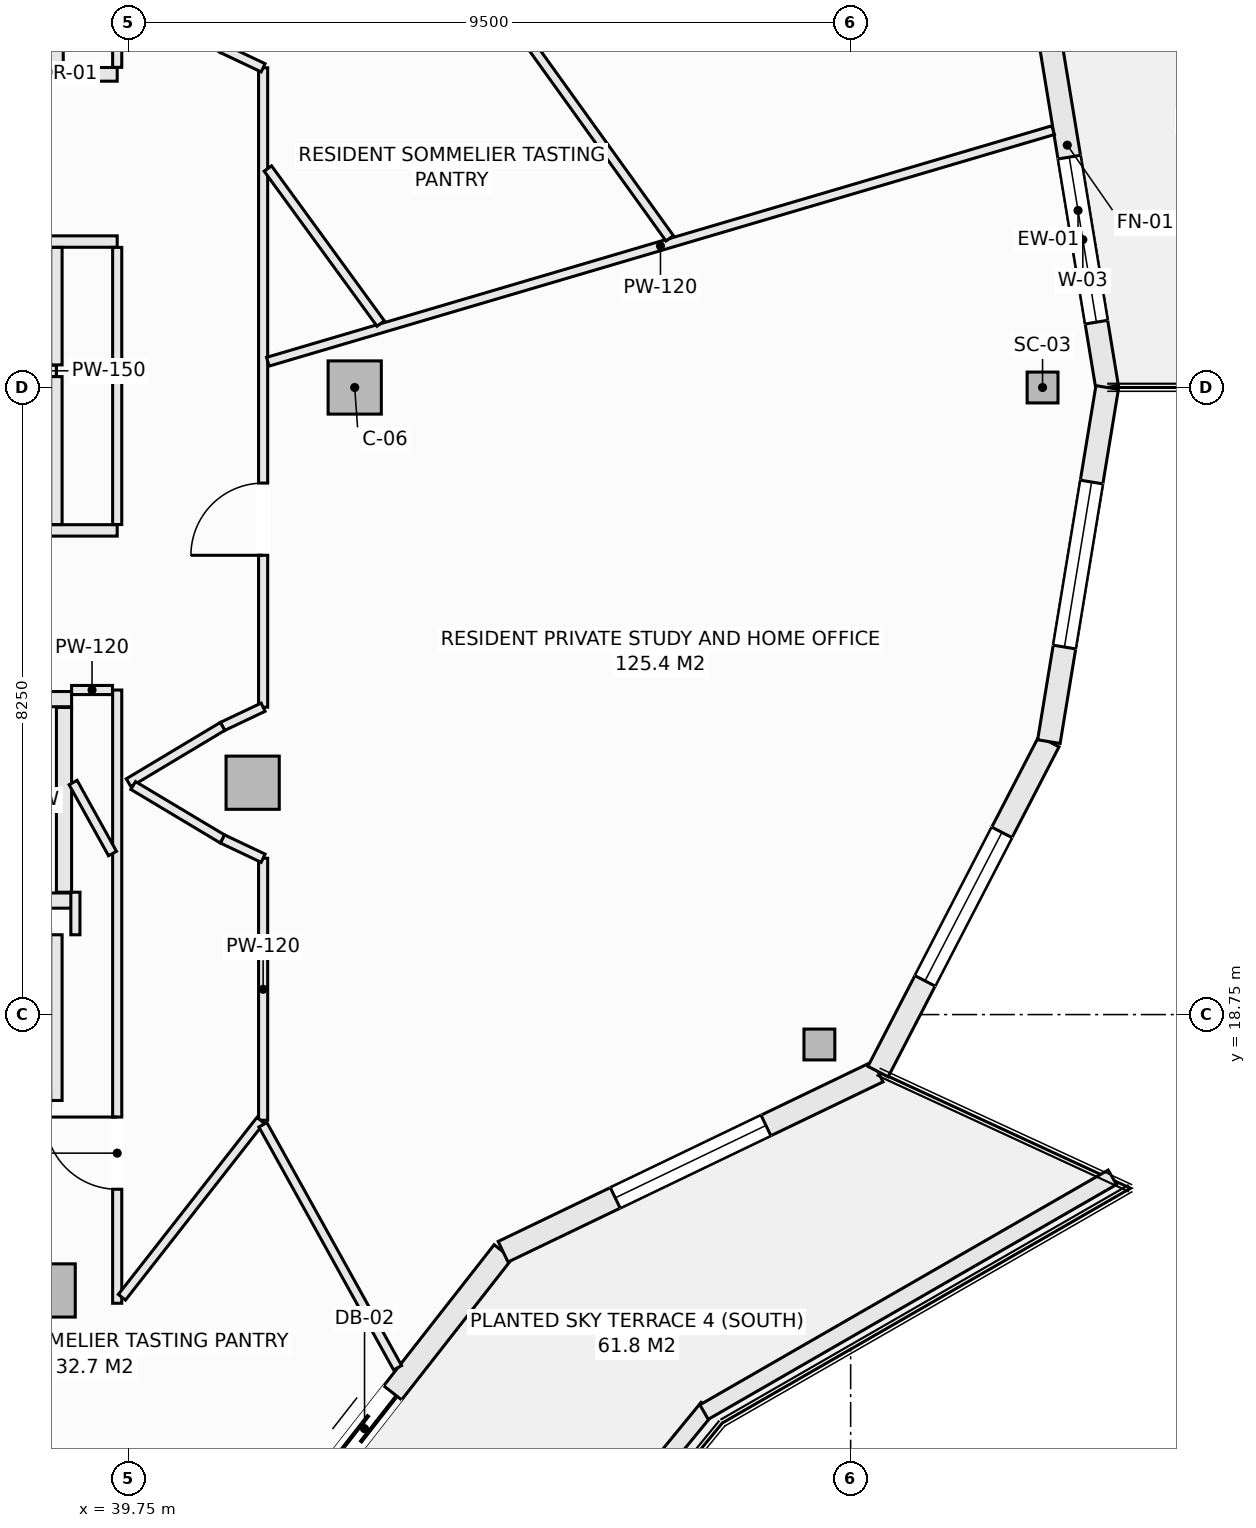
"""IFC4 building model, lengths in metres.
Left out: names, types, materials, properties, quantities, classifications, styles, units other than length and angle.
Written with IfcOpenShell. Run it as: python <this file> out.ifc"""

import sys

from ifc_helpers import new_model, si_unit, direction, frame, frame_2d, origin, origin_2d, place, context, subcontext, project, spatial, rectangle, hollow_rectangle, extrude, element, fill, save


model = new_model("IFC4")
c1 = context("Model", 3, precision=1e-05, world=origin(), true_north=direction((0.0, 1.0)))
c2 = subcontext(c1, "Body", "Model", "MODEL_VIEW")
j1 = project(units=[si_unit("LENGTHUNIT", "METRE"), si_unit("PLANEANGLEUNIT", "RADIAN")], contexts=[c1])
p1 = place(None, origin())
s1 = spatial("IfcSite", under=j1, at=p1, CompositionType="ELEMENT")
p2 = place(p1, origin())
s2 = spatial("IfcBuilding", under=s1, at=p2, CompositionType="ELEMENT")
p3 = place(p2, frame((0.0, 0.0, 245.9)))
s3 = spatial("IfcBuildingStorey", under=s2, at=p3, CompositionType="ELEMENT", Elevation=245.9)
for number, where, z_axis, x_axis in (
    (1, (51.775, 27.0, -0.27), (0.0, 0.0, 1.0), (1.0, 0.0, 0.0)),
    (2, (48.839, 18.356, -0.27), (0.0, 0.0, 1.0), (1.0, 0.0, 0.0)),
):
    element("IfcColumn", number, at=place(p3, frame(where, z_axis=z_axis, x_axis=x_axis)), inside=s3, PredefinedType="COLUMN", context=c2, shape_type="SweptSolid", body=[
        extrude(hollow_rectangle(XDim=0.406, YDim=0.406, WallThickness=0.016, at=origin_2d()), origin(), (0.0, 0.0, 1.0), 3.3),
    ])
for number, where, z_axis, x_axis in (
    (3, (42.725, 27.0, -0.27), (0.0, 0.0, 1.0), (1.0, 0.0, 0.0)),
    (4, (38.698, 15.121, -0.27), (0.0, 0.0, 1.0), (1.0, 0.0, 0.0)),
    (5, (41.382, 21.801, -0.27), (0.0, 0.0, 1.0), (1.0, 0.0, 0.0)),
):
    element("IfcColumn", number, at=place(p3, frame(where, z_axis=z_axis, x_axis=x_axis)), inside=s3, PredefinedType="COLUMN", context=c2, shape_type="SweptSolid", body=[
        extrude(rectangle(XDim=0.7, YDim=0.7, at=origin_2d()), origin(), (0.0, 0.0, 1.0), 3.3),
    ])
p4 = place(p3, frame((51.858, 31.659, 0.0), z_axis=(0.0, 0.0, 1.0), x_axis=(0.162369371657, -0.986730047758, 0.0)))
e6 = element("IfcWall", 6, at=p4, inside=s3, PredefinedType="SOLIDWALL", context=c2, shape_type="SweptSolid", body=[
    extrude(rectangle(XDim=4.721, YDim=0.3, at=frame_2d((2.361, 0.0))), origin(), (0.0, 0.0, 1.0), 2.605),
])
p5 = place(p4, frame((1.65, 0.0, 0.72)))
e7 = element("IfcOpeningElement", 7, at=p5, cuts=e6, PredefinedType="OPENING", context=c2, shape_type="SweptSolid", body=[
    extrude(rectangle(XDim=2.2, YDim=1.65, at=frame_2d((1.1, 0.825))), frame((0.0, 0.16, 0.0), z_axis=(0.0, -1.0, 0.0), x_axis=(1.0, 0.0, 0.0)), (0.0, 0.0, 1.0), 0.32),
])
p6 = place(p3, frame((41.375, 11.412, 0.0), z_axis=(0.0, 0.0, 1.0), x_axis=(0.61644588519, 0.787397276241, 0.0)))
e8 = element("IfcWall", 8, at=p6, inside=s3, PredefinedType="SOLIDWALL", context=c2, shape_type="SweptSolid", body=[
    extrude(rectangle(XDim=5.357, YDim=0.3, at=frame_2d((2.678, 0.0))), origin(), (0.0, 0.0, 1.0), 2.605),
])
p7 = place(p6, frame((1.8, 0.0, 0.0)))
e9 = element("IfcOpeningElement", 9, at=p7, cuts=e8, PredefinedType="OPENING", context=c2, shape_type="SweptSolid", body=[
    extrude(rectangle(XDim=1.2, YDim=2.2, at=frame_2d((0.6, 1.1))), frame((0.0, 0.16, 0.0), z_axis=(0.0, -1.0, 0.0), x_axis=(1.0, 0.0, 0.0)), (0.0, 0.0, 1.0), 0.32),
])
p8 = place(p3, frame((44.677, 15.63, 0.0), z_axis=(0.0, 0.0, 1.0), x_axis=(0.901355238351, 0.433080517106, 0.0)))
e10 = element("IfcWall", 10, at=p8, inside=s3, PredefinedType="SOLIDWALL", context=c2, shape_type="SweptSolid", body=[
    extrude(rectangle(XDim=5.473, YDim=0.3, at=frame_2d((2.737, 0.0))), origin(), (0.0, 0.0, 1.0), 2.605),
])
p9 = place(p8, frame((1.637, 0.0, 0.72)))
e11 = element("IfcOpeningElement", 11, at=p9, cuts=e10, PredefinedType="OPENING", context=c2, shape_type="SweptSolid", body=[
    extrude(rectangle(XDim=2.2, YDim=1.65, at=frame_2d((1.1, 0.825))), frame((0.0, 0.16, 0.0), z_axis=(0.0, -1.0, 0.0), x_axis=(1.0, 0.0, 0.0)), (0.0, 0.0, 1.0), 0.32),
])
p10 = place(p3, frame((49.611, 18.0, 0.0), z_axis=(0.0, 0.0, 1.0), x_axis=(0.459793771602, 0.888025724625, 0.0)))
e12 = element("IfcWall", 12, at=p10, inside=s3, PredefinedType="SOLIDWALL", context=c2, shape_type="SweptSolid", body=[
    extrude(rectangle(XDim=4.889, YDim=0.3, at=frame_2d((2.444, 0.0))), origin(), (0.0, 0.0, 1.0), 2.605),
])
p11 = place(p10, frame((1.344, 0.0, 0.72)))
e13 = element("IfcOpeningElement", 13, at=p11, cuts=e12, PredefinedType="OPENING", context=c2, shape_type="SweptSolid", body=[
    extrude(rectangle(XDim=2.2, YDim=1.65, at=frame_2d((1.1, 0.825))), frame((0.0, 0.16, 0.0), z_axis=(0.0, -1.0, 0.0), x_axis=(1.0, 0.0, 0.0)), (0.0, 0.0, 1.0), 0.32),
])
p12 = place(p3, frame((51.858, 22.341, 0.0), z_axis=(0.0, 0.0, 1.0), x_axis=(0.162369371657, 0.986730047758, 0.0)))
e14 = element("IfcWall", 14, at=p12, inside=s3, PredefinedType="SOLIDWALL", context=c2, shape_type="SweptSolid", body=[
    extrude(rectangle(XDim=4.721, YDim=0.3, at=frame_2d((2.361, 0.0))), origin(), (0.0, 0.0, 1.0), 2.605),
])
p13 = place(p12, frame((1.261, 0.0, 0.72)))
e15 = element("IfcOpeningElement", 15, at=p13, cuts=e14, PredefinedType="OPENING", context=c2, shape_type="SweptSolid", body=[
    extrude(rectangle(XDim=2.2, YDim=1.65, at=frame_2d((1.1, 0.825))), frame((0.0, 0.16, 0.0), z_axis=(0.0, -1.0, 0.0), x_axis=(1.0, 0.0, 0.0)), (0.0, 0.0, 1.0), 0.32),
])
p14 = place(p3, frame((43.323, 8.646, 0.0), z_axis=(0.0, 0.0, 1.0), x_axis=(0.63407318032, 0.77327304492, 0.0)))
e16 = element("IfcWall", 16, at=p14, inside=s3, PredefinedType="PARAPET", context=c2, shape_type="SweptSolid", body=[
    extrude(rectangle(XDim=6.379, YDim=0.22, at=frame_2d((3.189, 0.0))), origin(), (0.0, 0.0, 1.0), 0.52),
])
p15 = place(p3, frame((47.321, 13.521, 0.0), z_axis=(0.0, 0.0, 1.0), x_axis=(0.866901621005, 0.49847926687, 0.0)))
e17 = element("IfcWall", 17, at=p15, inside=s3, PredefinedType="PARAPET", context=c2, shape_type="SweptSolid", body=[
    extrude(rectangle(XDim=6.197, YDim=0.22, at=frame_2d((3.098, 0.0))), origin(), (0.0, 0.0, 1.0), 0.52),
])
p16 = place(p3, frame((36.75, 22.9, 0.0), z_axis=(0.0, 0.0, 1.0), x_axis=(1.0, 0.0, 0.0)))
e18 = element("IfcWall", 18, at=p16, inside=s3, PredefinedType="SOLIDWALL", context=c2, shape_type="SweptSolid", body=[
    extrude(rectangle(XDim=2.25, YDim=0.2, at=frame_2d((1.125, 0.0))), origin(), (0.0, 0.0, 1.0), 3.03),
])
p17 = place(p16, frame((0.575, 0.0, 0.0)))
e19 = element("IfcOpeningElement", 19, at=p17, cuts=e18, PredefinedType="OPENING", context=c2, shape_type="SweptSolid", body=[
    extrude(rectangle(XDim=1.1, YDim=2.2, at=frame_2d((0.55, 1.1))), frame((0.0, 0.11, 0.0), z_axis=(0.0, -1.0, 0.0), x_axis=(1.0, 0.0, 0.0)), (0.0, 0.0, 1.0), 0.22),
])
p18 = place(p3, frame((36.75, 20.25, 0.0), z_axis=(0.0, 0.0, 1.0), x_axis=(1.0, 0.0, 0.0)))
e20 = element("IfcWall", 20, at=p18, inside=s3, PredefinedType="SOLIDWALL", context=c2, shape_type="SweptSolid", body=[
    extrude(rectangle(XDim=2.25, YDim=0.2, at=frame_2d((1.125, 0.0))), origin(), (0.0, 0.0, 1.0), 3.03),
])
p19 = place(p3, frame((38.9, 20.36, 0.0), z_axis=(0.0, 0.0, 1.0), x_axis=(0.0, 1.0, 0.0)))
e21 = element("IfcWall", 21, at=p19, inside=s3, PredefinedType="SOLIDWALL", context=c2, shape_type="SweptSolid", body=[
    extrude(rectangle(XDim=2.43, YDim=0.2, at=frame_2d((1.215, 0.0))), origin(), (0.0, 0.0, 1.0), 3.03),
])
p20 = place(p3, frame((30.077, 28.92, 0.0), z_axis=(0.0, 0.0, 1.0), x_axis=(1.0, 0.0, 0.0)))
e22 = element("IfcWall", 22, at=p20, inside=s3, PredefinedType="PARTITIONING", context=c2, shape_type="SweptSolid", body=[
    extrude(rectangle(XDim=9.523, YDim=0.15, at=frame_2d((4.762, 0.0))), origin(), (0.0, 0.0, 1.0), 3.03),
])
p21 = place(p20, frame((1.342, 0.0, 0.0)))
e23 = element("IfcOpeningElement", 23, at=p21, cuts=e22, PredefinedType="OPENING", context=c2, shape_type="SweptSolid", body=[
    extrude(rectangle(XDim=0.95, YDim=2.1, at=frame_2d((0.475, 1.05))), frame((0.0, 0.085, 0.0), z_axis=(0.0, -1.0, 0.0), x_axis=(1.0, 0.0, 0.0)), (0.0, 0.0, 1.0), 0.17),
])
p22 = place(p20, frame((5.498, 0.0, 0.0)))
e24 = element("IfcOpeningElement", 24, at=p22, cuts=e22, PredefinedType="OPENING", context=c2, shape_type="SweptSolid", body=[
    extrude(rectangle(XDim=0.95, YDim=2.1, at=frame_2d((0.475, 1.05))), frame((0.0, 0.085, 0.0), z_axis=(0.0, -1.0, 0.0), x_axis=(1.0, 0.0, 0.0)), (0.0, 0.0, 1.0), 0.17),
])
p23 = place(p3, frame((33.377, 25.12, 0.0), z_axis=(0.0, 0.0, 1.0), x_axis=(1.0, 0.0, 0.0)))
e25 = element("IfcWall", 25, at=p23, inside=s3, PredefinedType="PARTITIONING", context=c2, shape_type="SweptSolid", body=[
    extrude(rectangle(XDim=6.223, YDim=0.15, at=frame_2d((3.112, 0.0))), origin(), (0.0, 0.0, 1.0), 3.03),
])
p24 = place(p23, frame((2.441, 0.0, 0.0)))
e26 = element("IfcOpeningElement", 26, at=p24, cuts=e25, PredefinedType="OPENING", context=c2, shape_type="SweptSolid", body=[
    extrude(rectangle(XDim=0.95, YDim=2.1, at=frame_2d((0.475, 1.05))), frame((0.0, 0.085, 0.0), z_axis=(0.0, -1.0, 0.0), x_axis=(1.0, 0.0, 0.0)), (0.0, 0.0, 1.0), 0.17),
])
p25 = place(p3, frame((33.377, 27.22, 0.0), z_axis=(0.0, 0.0, 1.0), x_axis=(1.0, 0.0, 0.0)))
e27 = element("IfcWall", 27, at=p25, inside=s3, PredefinedType="PARTITIONING", context=c2, shape_type="SweptSolid", body=[
    extrude(rectangle(XDim=5.423, YDim=0.15, at=frame_2d((2.711, 0.0))), origin(), (0.0, 0.0, 1.0), 3.03),
])
p26 = place(p3, frame((38.8, 17.62, 0.0), z_axis=(0.0, 0.0, 1.0), x_axis=(0.0, 1.0, 0.0)))
e28 = element("IfcWall", 28, at=p26, inside=s3, PredefinedType="PARTITIONING", context=c2, shape_type="SweptSolid", body=[
    extrude(rectangle(XDim=2.18, YDim=0.15, at=frame_2d((1.09, 0.0))), origin(), (0.0, 0.0, 1.0), 3.03),
])
p27 = place(p3, frame((38.8, 25.197, 0.0), z_axis=(0.0, 0.0, 1.0), x_axis=(0.0, 1.0, 0.0)))
e29 = element("IfcWall", 29, at=p27, inside=s3, PredefinedType="PARTITIONING", context=c2, shape_type="SweptSolid", body=[
    extrude(rectangle(XDim=1.946, YDim=0.15, at=frame_2d((0.973, 0.0))), origin(), (0.0, 0.0, 1.0), 3.03),
])
p28 = place(p3, frame((38.8, 27.297, 0.0), z_axis=(0.0, 0.0, 1.0), x_axis=(0.0, 1.0, 0.0)))
e30 = element("IfcWall", 30, at=p28, inside=s3, PredefinedType="PARTITIONING", context=c2, shape_type="SweptSolid", body=[
    extrude(rectangle(XDim=1.546, YDim=0.15, at=frame_2d((0.773, 0.0))), origin(), (0.0, 0.0, 1.0), 3.03),
])
p29 = place(p3, frame((38.8, 31.12, 0.0), z_axis=(0.0, 0.0, 1.0), x_axis=(0.0, 1.0, 0.0)))
e31 = element("IfcWall", 31, at=p29, inside=s3, PredefinedType="SOLIDWALL", context=c2, shape_type="SweptSolid", body=[
    extrude(rectangle(XDim=2.63, YDim=0.18, at=frame_2d((1.315, 0.0))), origin(), (0.0, 0.0, 1.0), 3.03),
])
p30 = place(p3, frame((38.892, 31.12, 0.0), z_axis=(0.0, 0.0, 1.0), x_axis=(1.0, 0.0, 0.0)))
e32 = element("IfcWall", 32, at=p30, inside=s3, PredefinedType="SOLIDWALL", context=c2, shape_type="SweptSolid", body=[
    extrude(rectangle(XDim=0.708, YDim=0.18, at=frame_2d((0.354, 0.0))), origin(), (0.0, 0.0, 1.0), 3.03),
])
p31 = place(p3, frame((39.05, 19.8, 0.0), z_axis=(0.0, 0.0, 1.0), x_axis=(0.0, 1.0, 0.0)))
e33 = element("IfcWall", 33, at=p31, inside=s3, PredefinedType="PARTITIONING", context=c2, shape_type="SweptSolid", body=[
    extrude(rectangle(XDim=0.56, YDim=0.12, at=frame_2d((0.28, 0.0))), origin(), (0.0, 0.0, 1.0), 3.03),
])
p32 = place(p3, frame((39.6, 14.952, 0.0), z_axis=(0.0, 0.0, 1.0), x_axis=(0.0, 1.0, 0.0)))
e34 = element("IfcWall", 34, at=p32, inside=s3, PredefinedType="PARTITIONING", context=c2, shape_type="SweptSolid", body=[
    extrude(rectangle(XDim=8.068, YDim=0.12, at=frame_2d((4.034, 0.0))), origin(), (0.0, 0.0, 1.0), 2.478),
])
p33 = place(p32, frame((1.5, 0.0, 0.0)))
e35 = element("IfcOpeningElement", 35, at=p33, cuts=e34, PredefinedType="OPENING", context=c2, shape_type="SweptSolid", body=[
    extrude(rectangle(XDim=0.95, YDim=2.1, at=frame_2d((0.475, 1.05))), frame((0.0, 0.07, 0.0), z_axis=(0.0, -1.0, 0.0), x_axis=(1.0, 0.0, 0.0)), (0.0, 0.0, 1.0), 0.14),
])
p34 = place(p3, frame((39.6, 25.197, 0.0), z_axis=(0.0, 0.0, 1.0), x_axis=(0.0, 1.0, 0.0)))
e36 = element("IfcWall", 36, at=p34, inside=s3, PredefinedType="PARTITIONING", context=c2, shape_type="SweptSolid", body=[
    extrude(rectangle(XDim=3.646, YDim=0.12, at=frame_2d((1.823, 0.0))), origin(), (0.0, 0.0, 1.0), 3.03),
])
p35 = place(p3, frame((39.6, 31.212, 0.0), z_axis=(0.0, 0.0, 1.0), x_axis=(0.0, 1.0, 0.0)))
e37 = element("IfcWall", 37, at=p35, inside=s3, PredefinedType="PARTITIONING", context=c2, shape_type="SweptSolid", body=[
    extrude(rectangle(XDim=7.871, YDim=0.12, at=frame_2d((3.936, 0.0))), origin(), (0.0, 0.0, 1.0), 3.03),
])
p36 = place(p35, frame((4.706, 0.0, 0.0)))
e38 = element("IfcOpeningElement", 38, at=p36, cuts=e37, PredefinedType="OPENING", context=c2, shape_type="SweptSolid", body=[
    extrude(rectangle(XDim=0.95, YDim=2.1, at=frame_2d((0.475, 1.05))), frame((0.0, 0.07, 0.0), z_axis=(0.0, -1.0, 0.0), x_axis=(1.0, 0.0, 0.0)), (0.0, 0.0, 1.0), 0.14),
])
p37 = place(p3, frame((41.52, 17.36, 0.0), z_axis=(0.0, 0.0, 1.0), x_axis=(0.0, 1.0, 0.0)))
e39 = element("IfcWall", 39, at=p37, inside=s3, PredefinedType="PARTITIONING", context=c2, shape_type="SweptSolid", body=[
    extrude(rectangle(XDim=3.447, YDim=0.12, at=frame_2d((1.723, 0.0))), origin(), (0.0, 0.0, 1.0), 3.03),
])
p38 = place(p3, frame((41.52, 22.794, 0.0), z_axis=(0.0, 0.0, 1.0), x_axis=(0.0, 1.0, 0.0)))
e40 = element("IfcWall", 40, at=p38, inside=s3, PredefinedType="PARTITIONING", context=c2, shape_type="SweptSolid", body=[
    extrude(rectangle(XDim=8.412, YDim=0.12, at=frame_2d((4.206, 0.0))), origin(), (0.0, 0.0, 1.0), 2.478),
])
p39 = place(p38, frame((1.999, 0.0, 0.0)))
e41 = element("IfcOpeningElement", 41, at=p39, cuts=e40, PredefinedType="OPENING", context=c2, shape_type="SweptSolid", body=[
    extrude(rectangle(XDim=0.95, YDim=2.1, at=frame_2d((0.475, 1.05))), frame((0.0, 0.07, 0.0), z_axis=(0.0, -1.0, 0.0), x_axis=(1.0, 0.0, 0.0)), (0.0, 0.0, 1.0), 0.14),
])
for number, where, z_axis, x_axis in (
    (42, (40.986, 31.459, 0.0), (0.0, 0.0, 1.0), (0.904, -0.428, 0.0)),
    (43, (40.986, 22.541, 0.0), (0.0, 0.0, 1.0), (0.904, 0.428, 0.0)),
):
    element("IfcWall", number, at=place(p3, frame(where, z_axis=z_axis, x_axis=x_axis)), inside=s3, PredefinedType="PARTITIONING", context=c2, shape_type="SweptSolid", body=[
        extrude(rectangle(XDim=0.591, YDim=0.12, at=frame_2d((0.295, 0.0))), origin(), (0.0, 0.0, 1.0), 3.03),
    ])
p40 = place(p3, frame((39.75, 21.8, 0.0), z_axis=(0.0, 0.0, 1.0), x_axis=(0.857702120906, 0.514146935996, 0.0)))
e44 = element("IfcWall", 44, at=p40, inside=s3, PredefinedType="PARTITIONING", context=c2, shape_type="SweptSolid", body=[
    extrude(rectangle(XDim=1.441, YDim=0.12, at=frame_2d((0.721, 0.0))), origin(), (0.0, 0.0, 1.0), 3.03),
])
p41 = place(p3, frame((39.81, 21.764, 0.0), z_axis=(0.0, 0.0, 1.0), x_axis=(0.858011245414, -0.513630901273, 0.0)))
e45 = element("IfcWall", 45, at=p41, inside=s3, PredefinedType="PARTITIONING", context=c2, shape_type="SweptSolid", body=[
    extrude(rectangle(XDim=1.37, YDim=0.12, at=frame_2d((0.685, 0.0))), origin(), (0.0, 0.0, 1.0), 3.03),
])
p42 = place(p3, frame((40.986, 21.06, 0.0), z_axis=(0.0, 0.0, 1.0), x_axis=(0.90356951601, -0.428441512621, 0.0)))
e46 = element("IfcWall", 46, at=p42, inside=s3, PredefinedType="PARTITIONING", context=c2, shape_type="SweptSolid", body=[
    extrude(rectangle(XDim=0.591, YDim=0.12, at=frame_2d((0.295, 0.0))), origin(), (0.0, 0.0, 1.0), 3.03),
])
p43 = place(p3, frame((39.662, 15.031, 0.0), z_axis=(0.0, 0.0, 1.0), x_axis=(0.616497420092, 0.787356927334, 0.0)))
e47 = element("IfcWall", 47, at=p43, inside=s3, PredefinedType="PARTITIONING", context=c2, shape_type="SweptSolid", body=[
    extrude(rectangle(XDim=2.958, YDim=0.12, at=frame_2d((1.479, 0.0))), origin(), (0.0, 0.0, 1.0), 3.03),
])
p44 = place(p3, frame((39.0, 23.02, 0.0), z_axis=(0.0, 0.0, 1.0), x_axis=(1.0, 0.0, 0.0)))
e48 = element("IfcWall", 48, at=p44, inside=s3, PredefinedType="PARTITIONING", context=c2, shape_type="SweptSolid", body=[
    extrude(rectangle(XDim=0.538, YDim=0.12, at=frame_2d((0.269, 0.0))), origin(), (0.0, 0.0, 1.0), 3.03),
])
p45 = place(p3, frame((41.582, 27.339, 0.0), z_axis=(0.0, 0.0, 1.0), x_axis=(0.959173635638, 0.282817850741, 0.0)))
e49 = element("IfcWall", 49, at=p45, inside=s3, PredefinedType="PARTITIONING", context=c2, shape_type="SweptSolid", body=[
    extrude(rectangle(XDim=10.771, YDim=0.12, at=frame_2d((5.386, 0.0))), origin(), (0.0, 0.0, 1.0), 3.03),
])
p46 = place(p3, frame((39.02, 21.803, 0.0), z_axis=(0.0, 0.0, 1.0), x_axis=(0.485021793049, -0.874502064187, 0.0)))
e50 = element("IfcWall", 50, at=p46, inside=s3, PredefinedType="PARTITIONING", context=c2, shape_type="SweptSolid", body=[
    extrude(rectangle(XDim=1.068, YDim=0.12, at=frame_2d((0.534, 0.0))), origin(), (0.0, 0.0, 1.0), 3.03),
])
p47 = place(p3, frame((41.517, 17.3, 0.0), z_axis=(0.0, 0.0, 1.0), x_axis=(0.484911097078, -0.874563449917, 0.0)))
e51 = element("IfcWall", 51, at=p47, inside=s3, PredefinedType="PARTITIONING", context=c2, shape_type="SweptSolid", body=[
    extrude(rectangle(XDim=3.655, YDim=0.12, at=frame_2d((1.827, 0.0))), origin(), (0.0, 0.0, 1.0), 2.77),
])
p48 = place(p3, frame((41.582, 29.881, 0.0), z_axis=(0.0, 0.0, 1.0), x_axis=(0.588620460465, -0.808409520925, 0.0)))
e52 = element("IfcWall", 52, at=p48, inside=s3, PredefinedType="PARTITIONING", context=c2, shape_type="SweptSolid", body=[
    extrude(rectangle(XDim=2.523, YDim=0.12, at=frame_2d((1.261, 0.0))), origin(), (0.0, 0.0, 1.0), 2.478),
])
p49 = place(p3, frame((41.582, 36.324, 0.0), z_axis=(0.0, 0.0, 1.0), x_axis=(0.583386800507, -0.812194460086, 0.0)))
e53 = element("IfcWall", 53, at=p49, inside=s3, PredefinedType="PARTITIONING", context=c2, shape_type="SweptSolid", body=[
    extrude(rectangle(XDim=9.063, YDim=0.12, at=frame_2d((4.532, 0.0))), origin(), (0.0, 0.0, 1.0), 3.03),
])
p50 = place(p5, origin())
e54 = element("IfcWindow", 54, at=p50, inside=s3, PartitioningType="SINGLE_PANEL", PredefinedType="WINDOW", context=c2, shape_type="SweptSolid", body=[
    extrude(rectangle(XDim=2.2, YDim=1.65, at=frame_2d((1.1, 0.825))), frame((0.0, 0.03, 0.0), z_axis=(0.0, -1.0, 0.0), x_axis=(1.0, 0.0, 0.0)), (0.0, 0.0, 1.0), 0.06),
])
fill(e7, e54)
p51 = place(p7, frame((1.2, 0.0, 0.0), z_axis=(0.0, 0.0, 1.0), x_axis=(-1.0, 0.0, 0.0)))
e55 = element("IfcDoor", 55, at=p51, inside=s3, OperationType="SLIDING_TO_LEFT", PredefinedType="DOOR", context=c2, shape_type="SweptSolid", body=[
    extrude(rectangle(XDim=1.2, YDim=2.2, at=frame_2d((0.6, 1.1))), frame((0.0, 0.025, 0.0), z_axis=(0.0, -1.0, 0.0), x_axis=(1.0, 0.0, 0.0)), (0.0, 0.0, 1.0), 0.05),
])
fill(e9, e55)
p52 = place(p9, origin())
e56 = element("IfcWindow", 56, at=p52, inside=s3, PartitioningType="SINGLE_PANEL", PredefinedType="WINDOW", context=c2, shape_type="SweptSolid", body=[
    extrude(rectangle(XDim=2.2, YDim=1.65, at=frame_2d((1.1, 0.825))), frame((0.0, 0.03, 0.0), z_axis=(0.0, -1.0, 0.0), x_axis=(1.0, 0.0, 0.0)), (0.0, 0.0, 1.0), 0.06),
])
fill(e11, e56)
p53 = place(p11, origin())
e57 = element("IfcWindow", 57, at=p53, inside=s3, PartitioningType="SINGLE_PANEL", PredefinedType="WINDOW", context=c2, shape_type="SweptSolid", body=[
    extrude(rectangle(XDim=2.2, YDim=1.65, at=frame_2d((1.1, 0.825))), frame((0.0, 0.03, 0.0), z_axis=(0.0, -1.0, 0.0), x_axis=(1.0, 0.0, 0.0)), (0.0, 0.0, 1.0), 0.06),
])
fill(e13, e57)
p54 = place(p13, origin())
e58 = element("IfcWindow", 58, at=p54, inside=s3, PartitioningType="SINGLE_PANEL", PredefinedType="WINDOW", context=c2, shape_type="SweptSolid", body=[
    extrude(rectangle(XDim=2.2, YDim=1.65, at=frame_2d((1.1, 0.825))), frame((0.0, 0.03, 0.0), z_axis=(0.0, -1.0, 0.0), x_axis=(1.0, 0.0, 0.0)), (0.0, 0.0, 1.0), 0.06),
])
fill(e15, e58)
p55 = place(p33, origin())
e59 = element("IfcDoor", 59, at=p55, inside=s3, OperationType="SINGLE_SWING_RIGHT", PredefinedType="DOOR", context=c2, shape_type="SweptSolid", body=[
    extrude(rectangle(XDim=0.95, YDim=2.1, at=frame_2d((0.475, 1.05))), frame((0.0, 0.025, 0.0), z_axis=(0.0, -1.0, 0.0), x_axis=(1.0, 0.0, 0.0)), (0.0, 0.0, 1.0), 0.05),
])
fill(e35, e59)
p56 = place(p39, origin())
e60 = element("IfcDoor", 60, at=p56, inside=s3, OperationType="SINGLE_SWING_LEFT", PredefinedType="DOOR", context=c2, shape_type="SweptSolid", body=[
    extrude(rectangle(XDim=0.95, YDim=2.1, at=frame_2d((0.475, 1.05))), frame((0.0, 0.025, 0.0), z_axis=(0.0, -1.0, 0.0), x_axis=(1.0, 0.0, 0.0)), (0.0, 0.0, 1.0), 0.05),
])
fill(e41, e60)
save(model, sys.argv[1])
